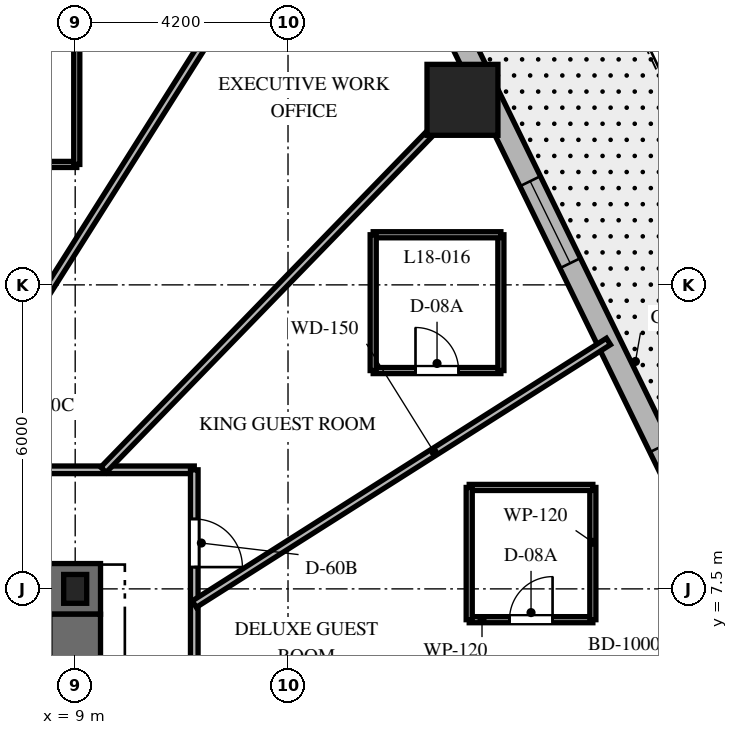
"""IFC4 building model, lengths in metres.
Left out: names, types, materials, properties, quantities, classifications, styles, units other than length and angle.
Written with IfcOpenShell. Run it as: python <this file> out.ifc"""

import sys

from ifc_helpers import new_model, si_unit, direction, frame, frame_2d, origin, origin_2d, place, context, subcontext, project, spatial, rectangle, i_section, extrude, element, fill, save


model = new_model("IFC4")
c1 = context("Model", 3, precision=1e-05, world=origin(), true_north=direction((0.0, 1.0)))
c2 = subcontext(c1, "Body", "Model", "MODEL_VIEW")
j1 = project(units=[si_unit("LENGTHUNIT", "METRE"), si_unit("PLANEANGLEUNIT", "RADIAN")], contexts=[c1])
p1 = place(None, origin())
s1 = spatial("IfcSite", under=j1, at=p1, CompositionType="ELEMENT")
p2 = place(p1, origin())
s2 = spatial("IfcBuilding", under=s1, at=p2, CompositionType="ELEMENT")
p3 = place(p2, frame((0.0, 0.0, 78.6)))
s3 = spatial("IfcBuildingStorey", under=s2, at=p3, CompositionType="ELEMENT", Elevation=78.6)
p4 = place(p3, frame((1.85, 7.5, 0.0), z_axis=(0.0, 0.0, 1.0), x_axis=(1.0, 0.0, 0.0)))
e1 = element("IfcWall", 1, at=p4, inside=s3, PredefinedType="SHEAR", context=c2, shape_type="SweptSolid", body=[
    extrude(rectangle(XDim=7.65, YDim=1.0, at=frame_2d((3.825, 0.0))), origin(), (0.0, 0.0, 1.0), 3.7),
])
p5 = place(p3, frame((9.0, -7.0, 0.0), z_axis=(0.0, 0.0, 1.0), x_axis=(0.0, 1.0, 0.0)))
e2 = element("IfcWall", 2, at=p5, inside=s3, PredefinedType="SHEAR", context=c2, shape_type="SweptSolid", body=[
    extrude(rectangle(XDim=14.0, YDim=1.0, at=frame_2d((7.0, 0.0))), origin(), (0.0, 0.0, 1.0), 3.7),
])
p6 = place(p5, frame((10.125, 0.0, 0.0)))
e3 = element("IfcOpeningElement", 3, at=p6, cuts=e2, PredefinedType="OPENING", context=c2, shape_type="SweptSolid", body=[
    extrude(rectangle(XDim=1.05, YDim=2.15, at=frame_2d((0.525, 1.075))), frame((0.0, 0.51, 0.0), z_axis=(0.0, -1.0, 0.0), x_axis=(1.0, 0.0, 0.0)), (0.0, 0.0, 1.0), 1.02),
])
p7 = place(p3, frame((9.0, 7.5, 0.0), z_axis=(0.0, 0.0, 1.0), x_axis=(1.0, 0.0, 0.0)))
e4 = element("IfcColumn", 4, at=p7, inside=s3, PredefinedType="COLUMN", context=c2, shape_type="SweptSolid", body=[
    extrude(i_section(OverallWidth=0.454, OverallDepth=0.569, WebThickness=0.078, FlangeThickness=0.125, at=origin_2d()), origin(), (0.0, 0.0, 1.0), 3.7),
])
p8 = place(p3, frame((16.643, 17.152, 0.0), z_axis=(0.0, 0.0, 1.0), x_axis=(1.0, 0.0, 0.0)))
e5 = element("IfcColumn", 5, at=p8, inside=s3, PredefinedType="COLUMN", context=c2, shape_type="SweptSolid", body=[
    extrude(rectangle(XDim=1.4, YDim=1.4, at=origin_2d()), origin(), (0.0, 0.0, 1.0), 3.7),
])
p9 = place(p3, frame((24.336, 2.532, 0.0), z_axis=(0.0, 0.0, 1.0), x_axis=(-0.438931326393, 0.898520612291, 0.0)))
e6 = element("IfcWall", 6, at=p9, inside=s3, PredefinedType="SOLIDWALL", context=c2, shape_type="SweptSolid", body=[
    extrude(rectangle(XDim=20.623, YDim=0.45, at=frame_2d((10.312, 0.0))), origin(), (0.0, 0.0, 1.0), 3.4),
])
p10 = place(p9, frame((5.171, 0.0, 0.0)))
e7 = element("IfcOpeningElement", 7, at=p10, cuts=e6, PredefinedType="OPENING", context=c2, shape_type="SweptSolid", body=[
    extrude(rectangle(XDim=1.0, YDim=2.15, at=frame_2d((0.5, 1.075))), frame((0.0, 0.235, 0.0), z_axis=(0.0, -1.0, 0.0), x_axis=(1.0, 0.0, 0.0)), (0.0, 0.0, 1.0), 0.47),
])
p11 = place(p9, frame((6.842, 0.0, 0.8)))
e8 = element("IfcOpeningElement", 8, at=p11, cuts=e6, PredefinedType="OPENING", context=c2, shape_type="SweptSolid", body=[
    extrude(rectangle(XDim=1.8, YDim=1.8, at=frame_2d((0.9, 0.9))), frame((0.0, 0.235, 0.0), z_axis=(0.0, -1.0, 0.0), x_axis=(1.0, 0.0, 0.0)), (0.0, 0.0, 1.0), 0.47),
])
p12 = place(p9, frame((12.683, 0.0, 0.8)))
e9 = element("IfcOpeningElement", 9, at=p12, cuts=e6, PredefinedType="OPENING", context=c2, shape_type="SweptSolid", body=[
    extrude(rectangle(XDim=1.8, YDim=1.8, at=frame_2d((0.9, 0.9))), frame((0.0, 0.235, 0.0), z_axis=(0.0, -1.0, 0.0), x_axis=(1.0, 0.0, 0.0)), (0.0, 0.0, 1.0), 0.47),
])
p13 = place(p9, frame((17.66, 0.0, 0.8)))
e10 = element("IfcOpeningElement", 10, at=p13, cuts=e6, PredefinedType="OPENING", context=c2, shape_type="SweptSolid", body=[
    extrude(rectangle(XDim=1.8, YDim=1.8, at=frame_2d((0.9, 0.9))), frame((0.0, 0.235, 0.0), z_axis=(0.0, -1.0, 0.0), x_axis=(1.0, 0.0, 0.0)), (0.0, 0.0, 1.0), 0.47),
])
p14 = place(p9, frame((1.214, 0.0, 0.8)))
e11 = element("IfcOpeningElement", 11, at=p14, cuts=e6, PredefinedType="OPENING", context=c2, shape_type="SweptSolid", body=[
    extrude(rectangle(XDim=1.8, YDim=1.8, at=frame_2d((0.9, 0.9))), frame((0.0, 0.235, 0.0), z_axis=(0.0, -1.0, 0.0), x_axis=(1.0, 0.0, 0.0)), (0.0, 0.0, 1.0), 0.47),
])
p15 = place(p3, frame((-11.35, 9.85, 0.0), z_axis=(0.0, 0.0, 1.0), x_axis=(1.0, 0.0, 0.0)))
e12 = element("IfcWall", 12, at=p15, inside=s3, PredefinedType="PARTITIONING", context=c2, shape_type="SweptSolid", body=[
    extrude(rectangle(XDim=22.7, YDim=0.15, at=frame_2d((11.35, 0.0))), origin(), (0.0, 0.0, 1.0), 2.84),
])
p16 = place(p15, frame((18.837, 0.0, 0.0)))
e13 = element("IfcOpeningElement", 13, at=p16, cuts=e12, PredefinedType="OPENING", context=c2, shape_type="SweptSolid", body=[
    extrude(rectangle(XDim=0.9, YDim=2.03, at=frame_2d((0.45, 1.015))), frame((0.0, 0.085, 0.0), z_axis=(0.0, -1.0, 0.0), x_axis=(1.0, 0.0, 0.0)), (0.0, 0.0, 1.0), 0.17),
])
p17 = place(p15, frame((15.532, 0.0, 0.0)))
e14 = element("IfcOpeningElement", 14, at=p17, cuts=e12, PredefinedType="OPENING", context=c2, shape_type="SweptSolid", body=[
    extrude(rectangle(XDim=0.95, YDim=2.03, at=frame_2d((0.475, 1.015))), frame((0.0, 0.085, 0.0), z_axis=(0.0, -1.0, 0.0), x_axis=(1.0, 0.0, 0.0)), (0.0, 0.0, 1.0), 0.17),
])
p18 = place(p15, frame((10.444, 0.0, 0.0)))
e15 = element("IfcOpeningElement", 15, at=p18, cuts=e12, PredefinedType="OPENING", context=c2, shape_type="SweptSolid", body=[
    extrude(rectangle(XDim=0.95, YDim=2.03, at=frame_2d((0.475, 1.015))), frame((0.0, 0.085, 0.0), z_axis=(0.0, -1.0, 0.0), x_axis=(1.0, 0.0, 0.0)), (0.0, 0.0, 1.0), 0.17),
])
p19 = place(p15, frame((3.369, 0.0, 0.0)))
e16 = element("IfcOpeningElement", 16, at=p19, cuts=e12, PredefinedType="OPENING", context=c2, shape_type="SweptSolid", body=[
    extrude(rectangle(XDim=0.95, YDim=2.03, at=frame_2d((0.475, 1.015))), frame((0.0, 0.085, 0.0), z_axis=(0.0, -1.0, 0.0), x_axis=(1.0, 0.0, 0.0)), (0.0, 0.0, 1.0), 0.17),
])
p20 = place(p3, frame((11.35, 9.85, 0.0), z_axis=(0.0, 0.0, 1.0), x_axis=(0.0, -1.0, 0.0)))
e17 = element("IfcWall", 17, at=p20, inside=s3, PredefinedType="PARTITIONING", context=c2, shape_type="SweptSolid", body=[
    extrude(rectangle(XDim=19.7, YDim=0.15, at=frame_2d((9.85, 0.0))), origin(), (0.0, 0.0, 1.0), 2.84),
])
p21 = place(p20, frame((4.208, 0.0, 0.0)))
e18 = element("IfcOpeningElement", 18, at=p21, cuts=e17, PredefinedType="OPENING", context=c2, shape_type="SweptSolid", body=[
    extrude(rectangle(XDim=0.95, YDim=2.03, at=frame_2d((0.475, 1.015))), frame((0.0, 0.085, 0.0), z_axis=(0.0, -1.0, 0.0), x_axis=(1.0, 0.0, 0.0)), (0.0, 0.0, 1.0), 0.17),
])
p22 = place(p20, frame((0.97, 0.0, 0.0)))
e19 = element("IfcOpeningElement", 19, at=p22, cuts=e17, PredefinedType="OPENING", context=c2, shape_type="SweptSolid", body=[
    extrude(rectangle(XDim=0.95, YDim=2.03, at=frame_2d((0.475, 1.015))), frame((0.0, 0.085, 0.0), z_axis=(0.0, -1.0, 0.0), x_axis=(1.0, 0.0, 0.0)), (0.0, 0.0, 1.0), 0.17),
])
p23 = place(p20, frame((17.181, 0.0, 0.0)))
e20 = element("IfcOpeningElement", 20, at=p23, cuts=e17, PredefinedType="OPENING", context=c2, shape_type="SweptSolid", body=[
    extrude(rectangle(XDim=0.95, YDim=2.03, at=frame_2d((0.475, 1.015))), frame((0.0, 0.085, 0.0), z_axis=(0.0, -1.0, 0.0), x_axis=(1.0, 0.0, 0.0)), (0.0, 0.0, 1.0), 0.17),
])
p24 = place(p20, frame((13.403, 0.0, 0.0)))
e21 = element("IfcOpeningElement", 21, at=p24, cuts=e17, PredefinedType="OPENING", context=c2, shape_type="SweptSolid", body=[
    extrude(rectangle(XDim=0.95, YDim=2.03, at=frame_2d((0.475, 1.015))), frame((0.0, 0.085, 0.0), z_axis=(0.0, -1.0, 0.0), x_axis=(1.0, 0.0, 0.0)), (0.0, 0.0, 1.0), 0.17),
])
p25 = place(p20, frame((8.838, 0.0, 0.0)))
e22 = element("IfcOpeningElement", 22, at=p25, cuts=e17, PredefinedType="OPENING", context=c2, shape_type="SweptSolid", body=[
    extrude(rectangle(XDim=0.95, YDim=2.03, at=frame_2d((0.475, 1.015))), frame((0.0, 0.085, 0.0), z_axis=(0.0, -1.0, 0.0), x_axis=(1.0, 0.0, 0.0)), (0.0, 0.0, 1.0), 0.17),
])
p26 = place(p3, frame((11.35, 3.091, 0.0), z_axis=(0.0, 0.0, 1.0), x_axis=(0.964859685283, 0.262765651704, 0.0)))
e23 = element("IfcWall", 23, at=p26, inside=s3, PredefinedType="PARTITIONING", context=c2, shape_type="SweptSolid", body=[
    extrude(rectangle(XDim=11.629, YDim=0.15, at=frame_2d((5.814, 0.0))), origin(), (0.0, 0.0, 1.0), 2.54),
])
p27 = place(p3, frame((11.35, 7.199, 0.0), z_axis=(0.0, 0.0, 1.0), x_axis=(0.844458213289, 0.535621439087, 0.0)))
e24 = element("IfcWall", 24, at=p27, inside=s3, PredefinedType="PARTITIONING", context=c2, shape_type="SweptSolid", body=[
    extrude(rectangle(XDim=9.679, YDim=0.15, at=frame_2d((4.84, 0.0))), origin(), (0.0, 0.0, 1.0), 2.54),
])
p28 = place(p3, frame((9.558, 9.85, 0.0), z_axis=(0.0, 0.0, 1.0), x_axis=(0.69638346089, 0.717669893056, 0.0)))
e25 = element("IfcWall", 25, at=p28, inside=s3, PredefinedType="PARTITIONING", context=c2, shape_type="SweptSolid", body=[
    extrude(rectangle(XDim=10.701, YDim=0.15, at=frame_2d((5.351, 0.0))), origin(), (0.0, 0.0, 1.0), 2.54),
])
p29 = place(p3, frame((6.222, 9.85, 0.0), z_axis=(0.0, 0.0, 1.0), x_axis=(0.534069056435, 0.845440857162, 0.0)))
e26 = element("IfcWall", 26, at=p29, inside=s3, PredefinedType="PARTITIONING", context=c2, shape_type="SweptSolid", body=[
    extrude(rectangle(XDim=14.611, YDim=0.15, at=frame_2d((7.306, 0.0))), origin(), (0.0, 0.0, 1.0), 2.54),
])
p30 = place(p3, frame((16.776, 6.892, 0.0), z_axis=(0.0, 0.0, 1.0), x_axis=(1.0, 0.0, 0.0)))
e27 = element("IfcWall", 27, at=p30, inside=s3, PredefinedType="PARTITIONING", context=c2, shape_type="SweptSolid", body=[
    extrude(rectangle(XDim=2.44, YDim=0.12, at=frame_2d((1.22, 0.0))), origin(), (0.0, 0.0, 1.0), 2.927),
])
p31 = place(p30, frame((0.795, 0.0, 0.0)))
e28 = element("IfcOpeningElement", 28, at=p31, cuts=e27, PredefinedType="OPENING", context=c2, shape_type="SweptSolid", body=[
    extrude(rectangle(XDim=0.85, YDim=2.03, at=frame_2d((0.425, 1.015))), frame((0.0, 0.07, 0.0), z_axis=(0.0, -1.0, 0.0), x_axis=(1.0, 0.0, 0.0)), (0.0, 0.0, 1.0), 0.14),
])
p32 = place(p3, frame((19.216, 6.892, 0.0), z_axis=(0.0, 0.0, 1.0), x_axis=(0.0, 1.0, 0.0)))
e29 = element("IfcWall", 29, at=p32, inside=s3, PredefinedType="PARTITIONING", context=c2, shape_type="SweptSolid", body=[
    extrude(rectangle(XDim=2.61, YDim=0.12, at=frame_2d((1.305, 0.0))), origin(), (0.0, 0.0, 1.0), 3.4),
])
p33 = place(p3, frame((19.216, 9.502, 0.0), z_axis=(0.0, 0.0, 1.0), x_axis=(-1.0, 0.0, 0.0)))
e30 = element("IfcWall", 30, at=p33, inside=s3, PredefinedType="PARTITIONING", context=c2, shape_type="SweptSolid", body=[
    extrude(rectangle(XDim=2.44, YDim=0.12, at=frame_2d((1.22, 0.0))), origin(), (0.0, 0.0, 1.0), 3.4),
])
p34 = place(p3, frame((16.776, 9.502, 0.0), z_axis=(0.0, 0.0, 1.0), x_axis=(0.0, -1.0, 0.0)))
e31 = element("IfcWall", 31, at=p34, inside=s3, PredefinedType="PARTITIONING", context=c2, shape_type="SweptSolid", body=[
    extrude(rectangle(XDim=2.61, YDim=0.12, at=frame_2d((1.305, 0.0))), origin(), (0.0, 0.0, 1.0), 2.927),
])
p35 = place(p3, frame((14.881, 11.809, 0.0), z_axis=(0.0, 0.0, 1.0), x_axis=(1.0, 0.0, 0.0)))
e32 = element("IfcWall", 32, at=p35, inside=s3, PredefinedType="PARTITIONING", context=c2, shape_type="SweptSolid", body=[
    extrude(rectangle(XDim=2.52, YDim=0.12, at=frame_2d((1.26, 0.0))), origin(), (0.0, 0.0, 1.0), 2.927),
])
p36 = place(p35, frame((0.835, 0.0, 0.0)))
e33 = element("IfcOpeningElement", 33, at=p36, cuts=e32, PredefinedType="OPENING", context=c2, shape_type="SweptSolid", body=[
    extrude(rectangle(XDim=0.85, YDim=2.03, at=frame_2d((0.425, 1.015))), frame((0.0, 0.07, 0.0), z_axis=(0.0, -1.0, 0.0), x_axis=(1.0, 0.0, 0.0)), (0.0, 0.0, 1.0), 0.14),
])
p37 = place(p3, frame((17.401, 11.809, 0.0), z_axis=(0.0, 0.0, 1.0), x_axis=(0.0, 1.0, 0.0)))
e34 = element("IfcWall", 34, at=p37, inside=s3, PredefinedType="PARTITIONING", context=c2, shape_type="SweptSolid", body=[
    extrude(rectangle(XDim=2.68, YDim=0.12, at=frame_2d((1.34, 0.0))), origin(), (0.0, 0.0, 1.0), 3.4),
])
p38 = place(p3, frame((17.401, 14.489, 0.0), z_axis=(0.0, 0.0, 1.0), x_axis=(-1.0, 0.0, 0.0)))
e35 = element("IfcWall", 35, at=p38, inside=s3, PredefinedType="PARTITIONING", context=c2, shape_type="SweptSolid", body=[
    extrude(rectangle(XDim=2.52, YDim=0.12, at=frame_2d((1.26, 0.0))), origin(), (0.0, 0.0, 1.0), 3.4),
])
p39 = place(p3, frame((14.881, 14.489, 0.0), z_axis=(0.0, 0.0, 1.0), x_axis=(0.0, -1.0, 0.0)))
e36 = element("IfcWall", 36, at=p39, inside=s3, PredefinedType="PARTITIONING", context=c2, shape_type="SweptSolid", body=[
    extrude(rectangle(XDim=2.68, YDim=0.12, at=frame_2d((1.34, 0.0))), origin(), (0.0, 0.0, 1.0), 2.927),
])
p40 = place(p3, frame((6.351, 15.877, 0.0), z_axis=(0.0, 0.0, 1.0), x_axis=(1.0, 0.0, 0.0)))
e37 = element("IfcWall", 37, at=p40, inside=s3, PredefinedType="PARTITIONING", context=c2, shape_type="SweptSolid", body=[
    extrude(rectangle(XDim=2.68, YDim=0.12, at=frame_2d((1.34, 0.0))), origin(), (0.0, 0.0, 1.0), 2.84),
])
p41 = place(p40, frame((0.915, 0.0, 0.0)))
e38 = element("IfcOpeningElement", 38, at=p41, cuts=e37, PredefinedType="OPENING", context=c2, shape_type="SweptSolid", body=[
    extrude(rectangle(XDim=0.85, YDim=2.03, at=frame_2d((0.425, 1.015))), frame((0.0, 0.07, 0.0), z_axis=(0.0, -1.0, 0.0), x_axis=(1.0, 0.0, 0.0)), (0.0, 0.0, 1.0), 0.14),
])
p42 = place(p3, frame((9.031, 15.877, 0.0), z_axis=(0.0, 0.0, 1.0), x_axis=(0.0, 1.0, 0.0)))
e39 = element("IfcWall", 39, at=p42, inside=s3, PredefinedType="PARTITIONING", context=c2, shape_type="SweptSolid", body=[
    extrude(rectangle(XDim=2.54, YDim=0.12, at=frame_2d((1.27, 0.0))), origin(), (0.0, 0.0, 1.0), 2.972),
])
p43 = place(p11, origin())
e40 = element("IfcWindow", 40, at=p43, inside=s3, PartitioningType="SINGLE_PANEL", PredefinedType="WINDOW", context=c2, shape_type="SweptSolid", body=[
    extrude(rectangle(XDim=1.8, YDim=1.8, at=frame_2d((0.9, 0.9))), frame((0.0, 0.03, 0.0), z_axis=(0.0, -1.0, 0.0), x_axis=(1.0, 0.0, 0.0)), (0.0, 0.0, 1.0), 0.06),
])
fill(e8, e40)
p44 = place(p12, origin())
e41 = element("IfcWindow", 41, at=p44, inside=s3, PartitioningType="SINGLE_PANEL", PredefinedType="WINDOW", context=c2, shape_type="SweptSolid", body=[
    extrude(rectangle(XDim=1.8, YDim=1.8, at=frame_2d((0.9, 0.9))), frame((0.0, 0.03, 0.0), z_axis=(0.0, -1.0, 0.0), x_axis=(1.0, 0.0, 0.0)), (0.0, 0.0, 1.0), 0.06),
])
fill(e9, e41)
p45 = place(p31, origin())
e42 = element("IfcDoor", 42, at=p45, inside=s3, OperationType="SINGLE_SWING_RIGHT", PredefinedType="DOOR", context=c2, shape_type="SweptSolid", body=[
    extrude(rectangle(XDim=0.85, YDim=2.03, at=frame_2d((0.425, 1.015))), frame((0.0, 0.025, 0.0), z_axis=(0.0, -1.0, 0.0), x_axis=(1.0, 0.0, 0.0)), (0.0, 0.0, 1.0), 0.05),
])
fill(e28, e42)
p46 = place(p22, origin())
e43 = element("IfcDoor", 43, at=p46, inside=s3, OperationType="SINGLE_SWING_RIGHT", PredefinedType="DOOR", context=c2, shape_type="SweptSolid", body=[
    extrude(rectangle(XDim=0.95, YDim=2.03, at=frame_2d((0.475, 1.015))), frame((0.0, 0.025, 0.0), z_axis=(0.0, -1.0, 0.0), x_axis=(1.0, 0.0, 0.0)), (0.0, 0.0, 1.0), 0.05),
])
fill(e19, e43)
p47 = place(p36, origin())
e44 = element("IfcDoor", 44, at=p47, inside=s3, OperationType="SINGLE_SWING_LEFT", PredefinedType="DOOR", context=c2, shape_type="SweptSolid", body=[
    extrude(rectangle(XDim=0.85, YDim=2.03, at=frame_2d((0.425, 1.015))), frame((0.0, 0.025, 0.0), z_axis=(0.0, -1.0, 0.0), x_axis=(1.0, 0.0, 0.0)), (0.0, 0.0, 1.0), 0.05),
])
fill(e33, e44)
save(model, sys.argv[1])
